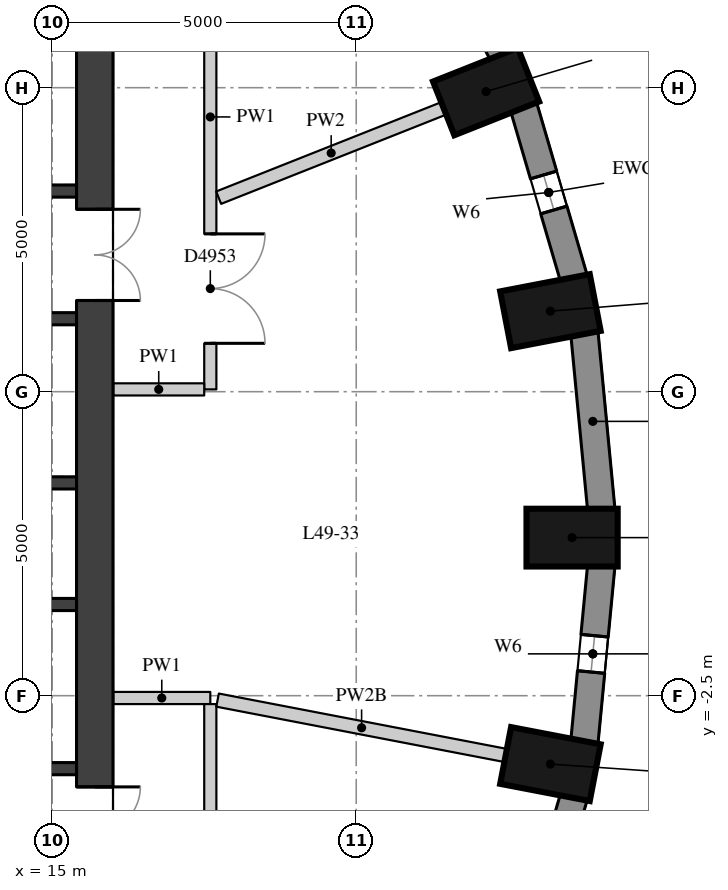
"""IFC4 building model, lengths in metres.
Left out: names, types, materials, properties, quantities, classifications, styles, units other than length and angle.
Written with IfcOpenShell. Run it as: python <this file> out.ifc"""

import sys

from ifc_helpers import new_model, si_unit, direction, frame, frame_2d, origin, origin_2d, place, context, subcontext, project, spatial, rectangle, extrude, element, fill, save


model = new_model("IFC4")
c1 = context("Model", 3, precision=1e-05, world=origin(), true_north=direction((0.0, 1.0)))
c2 = subcontext(c1, "Body", "Model", "MODEL_VIEW")
j1 = project(units=[si_unit("LENGTHUNIT", "METRE"), si_unit("PLANEANGLEUNIT", "RADIAN")], contexts=[c1])
p1 = place(None, origin())
s1 = spatial("IfcSite", under=j1, at=p1, CompositionType="ELEMENT")
p2 = place(p1, origin())
s2 = spatial("IfcBuilding", under=s1, at=p2, CompositionType="ELEMENT")
p3 = place(p2, frame((0.0, 0.0, 174.8)))
s3 = spatial("IfcBuildingStorey", under=s2, at=p3, CompositionType="ELEMENT", Elevation=174.8)
for number, where, z_axis, x_axis in (
    (1, (23.55, 0.1, 0.0), (0.0, 0.0, 1.0), (1.0, 0.0, 0.0)),
    (2, (23.194, 3.825, 0.0), (0.0, 0.0, 1.0), (0.982, 0.189, 0.0)),
    (3, (22.136, 7.436, 0.0), (0.0, 0.0, 1.0), (0.93, 0.369, 0.0)),
    (4, (23.194, -3.625, 0.0), (0.0, 0.0, 1.0), (0.982, -0.189, 0.0)),
):
    element("IfcColumn", number, at=place(p3, frame(where, z_axis=z_axis, x_axis=x_axis)), inside=s3, PredefinedType="COLUMN", context=c2, shape_type="SweptSolid", body=[
        extrude(rectangle(XDim=1.5, YDim=0.95, at=origin_2d()), origin(), (0.0, 0.0, 1.0), 3.3),
    ])
p4 = place(p3, frame((24.031, 0.555, 0.0), z_axis=(0.0, 0.0, 1.0), x_axis=(-0.095265737322, 0.995451876935, 0.0)))
e5 = element("IfcWall", 5, at=p4, inside=s3, PredefinedType="SOLIDWALL", context=c2, shape_type="SweptSolid", body=[
    extrude(rectangle(XDim=2.927, YDim=0.45, at=frame_2d((1.463, 0.0))), origin(), (0.0, 0.0, 1.0), 3.02),
])
p5 = place(p3, frame((23.58, 4.362, 0.0), z_axis=(0.0, 0.0, 1.0), x_axis=(-0.281049481624, 0.959693278542, 0.0)))
e6 = element("IfcWall", 6, at=p5, inside=s3, PredefinedType="SOLIDWALL", context=c2, shape_type="SweptSolid", body=[
    extrude(rectangle(XDim=2.948, YDim=0.45, at=frame_2d((1.474, 0.0))), origin(), (0.0, 0.0, 1.0), 3.02),
])
p6 = place(p5, frame((1.174, 0.0, 0.4)))
e7 = element("IfcOpeningElement", 7, at=p6, cuts=e6, PredefinedType="OPENING", context=c2, shape_type="SweptSolid", body=[
    extrude(rectangle(XDim=0.6, YDim=1.75, at=frame_2d((0.3, 0.875))), frame((0.0, 0.235, 0.0), z_axis=(0.0, -1.0, 0.0), x_axis=(1.0, 0.0, 0.0)), (0.0, 0.0, 1.0), 0.47),
])
p7 = place(p3, frame((22.415, 8.037, 0.0), z_axis=(0.0, 0.0, 1.0), x_axis=(-0.454133999889, 0.890933392653, 0.0)))
e8 = element("IfcWall", 8, at=p7, inside=s3, PredefinedType="SOLIDWALL", context=c2, shape_type="SweptSolid", body=[
    extrude(rectangle(XDim=2.986, YDim=0.45, at=frame_2d((1.493, 0.0))), origin(), (0.0, 0.0, 1.0), 3.02),
])
p8 = place(p3, frame((22.751, -6.991, 0.0), z_axis=(0.0, 0.0, 1.0), x_axis=(0.281049481624, 0.959693278542, 0.0)))
e9 = element("IfcWall", 9, at=p8, inside=s3, PredefinedType="SOLIDWALL", context=c2, shape_type="SweptSolid", body=[
    extrude(rectangle(XDim=2.948, YDim=0.45, at=frame_2d((1.474, 0.0))), origin(), (0.0, 0.0, 1.0), 3.02),
])
p9 = place(p3, frame((23.752, -3.269, 0.0), z_axis=(0.0, 0.0, 1.0), x_axis=(0.095257827044, 0.995452633924, 0.0)))
e10 = element("IfcWall", 10, at=p9, inside=s3, PredefinedType="SOLIDWALL", context=c2, shape_type="SweptSolid", body=[
    extrude(rectangle(XDim=2.927, YDim=0.45, at=frame_2d((1.463, 0.0))), origin(), (0.0, 0.0, 1.0), 3.02),
])
p10 = place(p9, frame((1.163, 0.0, 0.4)))
e11 = element("IfcOpeningElement", 11, at=p10, cuts=e10, PredefinedType="OPENING", context=c2, shape_type="SweptSolid", body=[
    extrude(rectangle(XDim=0.6, YDim=1.75, at=frame_2d((0.3, 0.875))), frame((0.0, 0.235, 0.0), z_axis=(0.0, -1.0, 0.0), x_axis=(1.0, 0.0, 0.0)), (0.0, 0.0, 1.0), 0.47),
])
p11 = place(p3, frame((15.7, -9.4, 0.0), z_axis=(0.0, 0.0, 1.0), x_axis=(0.0, 1.0, 0.0)))
e12 = element("IfcWall", 12, at=p11, inside=s3, PredefinedType="SHEAR", context=c2, shape_type="SweptSolid", body=[
    extrude(rectangle(XDim=18.8, YDim=0.6, at=frame_2d((9.4, 0.0))), origin(), (0.0, 0.0, 1.0), 3.02),
])
p12 = place(p11, frame((13.4, 0.0, 0.0)))
e13 = element("IfcOpeningElement", 13, at=p12, cuts=e12, PredefinedType="OPENING", context=c2, shape_type="SweptSolid", body=[
    extrude(rectangle(XDim=1.5, YDim=2.1, at=frame_2d((0.75, 1.05))), frame((0.0, 0.31, 0.0), z_axis=(0.0, -1.0, 0.0), x_axis=(1.0, 0.0, 0.0)), (0.0, 0.0, 1.0), 0.62),
])
p13 = place(p11, frame((3.9, 0.0, 0.0)))
e14 = element("IfcOpeningElement", 14, at=p13, cuts=e12, PredefinedType="OPENING", context=c2, shape_type="SweptSolid", body=[
    extrude(rectangle(XDim=1.5, YDim=2.1, at=frame_2d((0.75, 1.05))), frame((0.0, 0.31, 0.0), z_axis=(0.0, -1.0, 0.0), x_axis=(1.0, 0.0, 0.0)), (0.0, 0.0, 1.0), 0.62),
])
p14 = place(p3, frame((4.6, 5.8, 0.0), z_axis=(0.0, 0.0, 1.0), x_axis=(1.0, 0.0, 0.0)))
e15 = element("IfcWall", 15, at=p14, inside=s3, PredefinedType="SHEAR", context=c2, shape_type="SweptSolid", body=[
    extrude(rectangle(XDim=10.8, YDim=0.2, at=frame_2d((5.4, 0.0))), origin(), (0.0, 0.0, 1.0), 3.02),
])
p15 = place(p14, frame((7.05, 0.0, 0.0)))
e16 = element("IfcOpeningElement", 16, at=p15, cuts=e15, PredefinedType="OPENING", context=c2, shape_type="SweptSolid", body=[
    extrude(rectangle(XDim=1.1, YDim=2.1, at=frame_2d((0.55, 1.05))), frame((0.0, 0.11, 0.0), z_axis=(0.0, -1.0, 0.0), x_axis=(1.0, 0.0, 0.0)), (0.0, 0.0, 1.0), 0.22),
])
p16 = place(p14, frame((9.05, 0.0, 0.0)))
e17 = element("IfcOpeningElement", 17, at=p16, cuts=e15, PredefinedType="OPENING", context=c2, shape_type="SweptSolid", body=[
    extrude(rectangle(XDim=1.1, YDim=2.1, at=frame_2d((0.55, 1.05))), frame((0.0, 0.11, 0.0), z_axis=(0.0, -1.0, 0.0), x_axis=(1.0, 0.0, 0.0)), (0.0, 0.0, 1.0), 0.22),
])
p17 = place(p3, frame((4.6, 3.7, 0.0), z_axis=(0.0, 0.0, 1.0), x_axis=(1.0, 0.0, 0.0)))
e18 = element("IfcWall", 18, at=p17, inside=s3, PredefinedType="SHEAR", context=c2, shape_type="SweptSolid", body=[
    extrude(rectangle(XDim=10.8, YDim=0.2, at=frame_2d((5.4, 0.0))), origin(), (0.0, 0.0, 1.0), 3.02),
])
p18 = place(p17, frame((6.6, 0.0, 0.0)))
e19 = element("IfcOpeningElement", 19, at=p18, cuts=e18, PredefinedType="OPENING", context=c2, shape_type="SweptSolid", body=[
    extrude(rectangle(XDim=1.1, YDim=2.1, at=frame_2d((0.55, 1.05))), frame((0.0, 0.11, 0.0), z_axis=(0.0, -1.0, 0.0), x_axis=(1.0, 0.0, 0.0)), (0.0, 0.0, 1.0), 0.22),
])
p19 = place(p17, frame((8.9, 0.0, 0.0)))
e20 = element("IfcOpeningElement", 20, at=p19, cuts=e18, PredefinedType="OPENING", context=c2, shape_type="SweptSolid", body=[
    extrude(rectangle(XDim=1.1, YDim=2.1, at=frame_2d((0.55, 1.05))), frame((0.0, 0.11, 0.0), z_axis=(0.0, -1.0, 0.0), x_axis=(1.0, 0.0, 0.0)), (0.0, 0.0, 1.0), 0.22),
])
for number, where, z_axis, x_axis in (
    (21, (4.6, 1.0, 0.0), (0.0, 0.0, 1.0), (1.0, 0.0, 0.0)),
    (22, (4.6, -1.0, 0.0), (0.0, 0.0, 1.0), (1.0, 0.0, 0.0)),
):
    element("IfcWall", number, at=place(p3, frame(where, z_axis=z_axis, x_axis=x_axis)), inside=s3, PredefinedType="SHEAR", context=c2, shape_type="SweptSolid", body=[
        extrude(rectangle(XDim=10.8, YDim=0.2, at=frame_2d((5.4, 0.0))), origin(), (0.0, 0.0, 1.0), 3.02),
    ])
p20 = place(p3, frame((4.6, -3.7, 0.0), z_axis=(0.0, 0.0, 1.0), x_axis=(1.0, 0.0, 0.0)))
e23 = element("IfcWall", 23, at=p20, inside=s3, PredefinedType="SHEAR", context=c2, shape_type="SweptSolid", body=[
    extrude(rectangle(XDim=10.8, YDim=0.2, at=frame_2d((5.4, 0.0))), origin(), (0.0, 0.0, 1.0), 3.02),
])
p21 = place(p20, frame((6.6, 0.0, 0.0)))
e24 = element("IfcOpeningElement", 24, at=p21, cuts=e23, PredefinedType="OPENING", context=c2, shape_type="SweptSolid", body=[
    extrude(rectangle(XDim=1.1, YDim=2.1, at=frame_2d((0.55, 1.05))), frame((0.0, 0.11, 0.0), z_axis=(0.0, -1.0, 0.0), x_axis=(1.0, 0.0, 0.0)), (0.0, 0.0, 1.0), 0.22),
])
p22 = place(p20, frame((8.9, 0.0, 0.0)))
e25 = element("IfcOpeningElement", 25, at=p22, cuts=e23, PredefinedType="OPENING", context=c2, shape_type="SweptSolid", body=[
    extrude(rectangle(XDim=1.1, YDim=2.1, at=frame_2d((0.55, 1.05))), frame((0.0, 0.11, 0.0), z_axis=(0.0, -1.0, 0.0), x_axis=(1.0, 0.0, 0.0)), (0.0, 0.0, 1.0), 0.22),
])
p23 = place(p3, frame((17.6, 11.5, 0.0), z_axis=(0.0, 0.0, 1.0), x_axis=(0.0, -1.0, 0.0)))
e26 = element("IfcWall", 26, at=p23, inside=s3, PredefinedType="PARTITIONING", context=c2, shape_type="SweptSolid", body=[
    extrude(rectangle(XDim=8.962, YDim=0.2, at=frame_2d((4.481, 0.0))), origin(), (0.0, 0.0, 1.0), 3.02),
])
p24 = place(p23, frame((6.404, 0.0, 0.0)))
e27 = element("IfcOpeningElement", 27, at=p24, cuts=e26, PredefinedType="OPENING", context=c2, shape_type="SweptSolid", body=[
    extrude(rectangle(XDim=1.8, YDim=2.1, at=frame_2d((0.9, 1.05))), frame((0.0, 0.11, 0.0), z_axis=(0.0, -1.0, 0.0), x_axis=(1.0, 0.0, 0.0)), (0.0, 0.0, 1.0), 0.22),
])
p25 = place(p3, frame((17.5, 2.538, 0.0), z_axis=(0.0, 0.0, 1.0), x_axis=(-1.0, 0.0, 0.0)))
e28 = element("IfcWall", 28, at=p25, inside=s3, PredefinedType="PARTITIONING", context=c2, shape_type="SweptSolid", body=[
    extrude(rectangle(XDim=1.496, YDim=0.2, at=frame_2d((0.748, 0.0))), origin(), (0.0, 0.0, 1.0), 3.02),
])
p26 = place(p3, frame((16.004, -2.538, 0.0), z_axis=(0.0, 0.0, 1.0), x_axis=(1.0, 0.0, 0.0)))
e29 = element("IfcWall", 29, at=p26, inside=s3, PredefinedType="PARTITIONING", context=c2, shape_type="SweptSolid", body=[
    extrude(rectangle(XDim=1.596, YDim=0.2, at=frame_2d((0.798, 0.0))), origin(), (0.0, 0.0, 1.0), 3.02),
])
p27 = place(p3, frame((17.6, -2.638, 0.0), z_axis=(0.0, 0.0, 1.0), x_axis=(0.0, -1.0, 0.0)))
e30 = element("IfcWall", 30, at=p27, inside=s3, PredefinedType="PARTITIONING", context=c2, shape_type="SweptSolid", body=[
    extrude(rectangle(XDim=8.962, YDim=0.2, at=frame_2d((4.481, 0.0))), origin(), (0.0, 0.0, 1.0), 3.02),
])
p28 = place(p27, frame((3.581, 0.0, 0.0)))
e31 = element("IfcOpeningElement", 31, at=p28, cuts=e30, PredefinedType="OPENING", context=c2, shape_type="SweptSolid", body=[
    extrude(rectangle(XDim=1.8, YDim=2.1, at=frame_2d((0.9, 1.05))), frame((0.0, 0.11, 0.0), z_axis=(0.0, -1.0, 0.0), x_axis=(1.0, 0.0, 0.0)), (0.0, 0.0, 1.0), 0.22),
])
p29 = place(p3, frame((21.439, 7.16, 0.0), z_axis=(0.0, 0.0, 1.0), x_axis=(-0.929517399972, -0.368778257426, 0.0)))
e32 = element("IfcWall", 32, at=p29, inside=s3, PredefinedType="PARTITIONING", context=c2, shape_type="SweptSolid", body=[
    extrude(rectangle(XDim=3.982, YDim=0.22, at=frame_2d((1.991, 0.0))), origin(), (0.0, 0.0, 1.0), 3.02),
])
p30 = place(p3, frame((22.457, -3.483, 0.0), z_axis=(0.0, 0.0, 1.0), x_axis=(-0.982022686577, 0.188762928159, 0.0)))
e33 = element("IfcWall", 33, at=p30, inside=s3, PredefinedType="PARTITIONING", context=c2, shape_type="SweptSolid", body=[
    extrude(rectangle(XDim=4.824, YDim=0.22, at=frame_2d((2.412, 0.0))), origin(), (0.0, 0.0, 1.0), 2.57),
])
p31 = place(p6, origin())
e34 = element("IfcWindow", 34, at=p31, inside=s3, PartitioningType="SINGLE_PANEL", PredefinedType="WINDOW", context=c2, shape_type="SweptSolid", body=[
    extrude(rectangle(XDim=0.6, YDim=1.75, at=frame_2d((0.3, 0.875))), frame((0.0, 0.035, 0.0), z_axis=(0.0, -1.0, 0.0), x_axis=(1.0, 0.0, 0.0)), (0.0, 0.0, 1.0), 0.06),
])
fill(e7, e34)
p32 = place(p10, origin())
e35 = element("IfcWindow", 35, at=p32, inside=s3, PartitioningType="SINGLE_PANEL", PredefinedType="WINDOW", context=c2, shape_type="SweptSolid", body=[
    extrude(rectangle(XDim=0.6, YDim=1.75, at=frame_2d((0.3, 0.875))), frame((0.0, 0.035, 0.0), z_axis=(0.0, -1.0, 0.0), x_axis=(1.0, 0.0, 0.0)), (0.0, 0.0, 1.0), 0.06),
])
fill(e11, e35)
p33 = place(p12, origin())
e36 = element("IfcDoor", 36, at=p33, inside=s3, OperationType="DOUBLE_DOOR_SINGLE_SWING", PredefinedType="DOOR", context=c2, shape_type="SweptSolid", body=[
    extrude(rectangle(XDim=1.5, YDim=2.1, at=frame_2d((0.75, 1.05))), frame((0.0, 0.025, 0.0), z_axis=(0.0, -1.0, 0.0), x_axis=(1.0, 0.0, 0.0)), (0.0, 0.0, 1.0), 0.05),
])
fill(e13, e36)
p34 = place(p13, origin())
e37 = element("IfcDoor", 37, at=p34, inside=s3, OperationType="DOUBLE_DOOR_SINGLE_SWING", PredefinedType="DOOR", context=c2, shape_type="SweptSolid", body=[
    extrude(rectangle(XDim=1.5, YDim=2.1, at=frame_2d((0.75, 1.05))), frame((0.0, 0.025, 0.0), z_axis=(0.0, -1.0, 0.0), x_axis=(1.0, 0.0, 0.0)), (0.0, 0.0, 1.0), 0.05),
])
fill(e14, e37)
p35 = place(p24, origin())
e38 = element("IfcDoor", 38, at=p35, inside=s3, OperationType="DOUBLE_DOOR_SINGLE_SWING", PredefinedType="DOOR", context=c2, shape_type="SweptSolid", body=[
    extrude(rectangle(XDim=1.8, YDim=2.1, at=frame_2d((0.9, 1.05))), frame((0.0, 0.025, 0.0), z_axis=(0.0, -1.0, 0.0), x_axis=(1.0, 0.0, 0.0)), (0.0, 0.0, 1.0), 0.05),
])
fill(e27, e38)
save(model, sys.argv[1])
